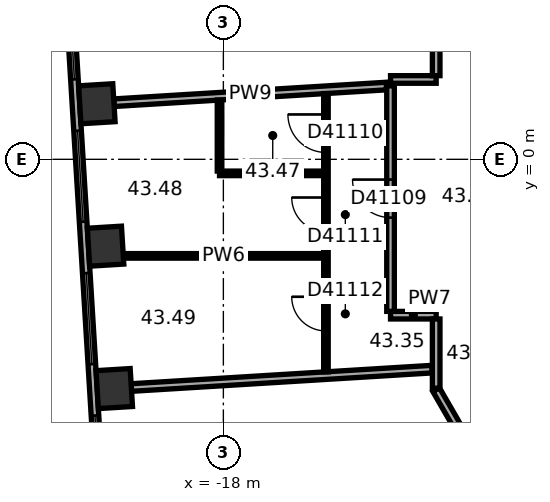
"""IFC4 building model, lengths in metres.
Left out: names, types, materials, properties, quantities, classifications, styles, units other than length and angle.
Written with IfcOpenShell. Run it as: python <this file> out.ifc"""

import sys

from ifc_helpers import new_model, si_unit, direction, frame, frame_2d, origin, origin_2d, place, context, subcontext, project, spatial, rectangle, extrude, element, fill, save


model = new_model("IFC4")
c1 = context("Model", 3, precision=1e-05, world=origin(), true_north=direction((0.0, 1.0)))
c2 = subcontext(c1, "Body", "Model", "MODEL_VIEW")
j1 = project(units=[si_unit("LENGTHUNIT", "METRE"), si_unit("PLANEANGLEUNIT", "RADIAN")], contexts=[c1])
p1 = place(None, origin())
s1 = spatial("IfcSite", under=j1, at=p1, CompositionType="ELEMENT")
p2 = place(p1, origin())
s2 = spatial("IfcBuilding", under=s1, at=p2, CompositionType="ELEMENT")
p3 = place(p2, frame((0.0, 0.0, 176.2)))
s3 = spatial("IfcBuildingStorey", under=s2, at=p3, CompositionType="ELEMENT", Elevation=176.2)
for number, where, z_axis, x_axis in (
    (1, (-21.329, 1.462, 0.0), (0.0, 0.0, 1.0), (0.061, -0.998, 0.0)),
    (2, (-21.1, -2.285, 0.0), (0.0, 0.0, 1.0), (0.061, -0.998, 0.0)),
    (3, (-20.871, -6.032, 0.0), (0.0, 0.0, 1.0), (0.061, -0.998, 0.0)),
):
    element("IfcColumn", number, at=place(p3, frame(where, z_axis=z_axis, x_axis=x_axis)), inside=s3, PredefinedType="COLUMN", context=c2, shape_type="SweptSolid", body=[
        extrude(rectangle(XDim=1.0, YDim=0.9, at=origin_2d()), origin(), (0.0, 0.0, 1.0), 3.7),
    ])
p4 = place(p3, frame((-22.375, 9.557, 0.0), z_axis=(0.0, 0.0, 1.0), x_axis=(0.061036015339, -0.998135564356, 0.0)))
e4 = element("IfcWall", 4, at=p4, inside=s3, PredefinedType="STANDARD", context=c2, shape_type="SweptSolid", body=[
    extrude(rectangle(XDim=20.044, YDim=0.2, at=frame_2d((10.022, 0.0))), origin(), (0.0, 0.0, 1.0), 3.7),
])
p5 = place(p4, frame((1.313, 0.0, 0.9)))
e5 = element("IfcOpeningElement", 5, at=p5, cuts=e4, PredefinedType="OPENING", context=c2, shape_type="SweptSolid", body=[
    extrude(rectangle(XDim=2.4, YDim=2.0, at=frame_2d((1.2, 1.0))), frame((0.0, 0.11, 0.0), z_axis=(0.0, -1.0, 0.0), x_axis=(1.0, 0.0, 0.0)), (0.0, 0.0, 1.0), 0.22),
])
p6 = place(p4, frame((5.067, 0.0, 0.9)))
e6 = element("IfcOpeningElement", 6, at=p6, cuts=e4, PredefinedType="OPENING", context=c2, shape_type="SweptSolid", body=[
    extrude(rectangle(XDim=2.4, YDim=2.0, at=frame_2d((1.2, 1.0))), frame((0.0, 0.11, 0.0), z_axis=(0.0, -1.0, 0.0), x_axis=(1.0, 0.0, 0.0)), (0.0, 0.0, 1.0), 0.22),
])
p7 = place(p4, frame((8.821, 0.0, 0.9)))
e7 = element("IfcOpeningElement", 7, at=p7, cuts=e4, PredefinedType="OPENING", context=c2, shape_type="SweptSolid", body=[
    extrude(rectangle(XDim=2.4, YDim=2.0, at=frame_2d((1.2, 1.0))), frame((0.0, 0.11, 0.0), z_axis=(0.0, -1.0, 0.0), x_axis=(1.0, 0.0, 0.0)), (0.0, 0.0, 1.0), 0.22),
])
p8 = place(p4, frame((12.575, 0.0, 0.9)))
e8 = element("IfcOpeningElement", 8, at=p8, cuts=e4, PredefinedType="OPENING", context=c2, shape_type="SweptSolid", body=[
    extrude(rectangle(XDim=2.4, YDim=2.0, at=frame_2d((1.2, 1.0))), frame((0.0, 0.11, 0.0), z_axis=(0.0, -1.0, 0.0), x_axis=(1.0, 0.0, 0.0)), (0.0, 0.0, 1.0), 0.22),
])
p9 = place(p4, frame((16.329, 0.0, 0.9)))
e9 = element("IfcOpeningElement", 9, at=p9, cuts=e4, PredefinedType="OPENING", context=c2, shape_type="SweptSolid", body=[
    extrude(rectangle(XDim=2.4, YDim=2.0, at=frame_2d((1.2, 1.0))), frame((0.0, 0.11, 0.0), z_axis=(0.0, -1.0, 0.0), x_axis=(1.0, 0.0, 0.0)), (0.0, 0.0, 1.0), 0.22),
])
p10 = place(p3, frame((-20.88, 1.49, 0.0), z_axis=(0.0, 0.0, 1.0), x_axis=(0.998134881975, 0.061047173439, 0.0)))
e10 = element("IfcWall", 10, at=p10, inside=s3, PredefinedType="PARTITIONING", context=c2, shape_type="SweptSolid", body=[
    extrude(rectangle(XDim=7.183, YDim=0.2, at=frame_2d((3.591, 0.0))), origin(), (0.0, 0.0, 1.0), 2.87),
])
p11 = place(p3, frame((-20.633, -2.541, 0.0), z_axis=(0.0, 0.0, 1.0), x_axis=(1.0, 0.0, 0.0)))
e11 = element("IfcWall", 11, at=p11, inside=s3, PredefinedType="PARTITIONING", context=c2, shape_type="SweptSolid", body=[
    extrude(rectangle(XDim=5.272, YDim=0.12, at=frame_2d((2.636, 0.0))), origin(), (0.0, 0.0, 1.0), 3.42),
])
p12 = place(p3, frame((-20.421, -6.005, 0.0), z_axis=(0.0, 0.0, 1.0), x_axis=(0.998134865741, 0.061047438866, 0.0)))
e12 = element("IfcWall", 12, at=p12, inside=s3, PredefinedType="PARTITIONING", context=c2, shape_type="SweptSolid", body=[
    extrude(rectangle(XDim=7.927, YDim=0.2, at=frame_2d((3.963, 0.0))), origin(), (0.0, 0.0, 1.0), 2.87),
])
p13 = place(p3, frame((-18.101, -0.369, 0.0), z_axis=(0.0, 0.0, 1.0), x_axis=(1.0, 0.0, 0.0)))
e13 = element("IfcWall", 13, at=p13, inside=s3, PredefinedType="PARTITIONING", context=c2, shape_type="SweptSolid", body=[
    extrude(rectangle(XDim=2.74, YDim=0.12, at=frame_2d((1.37, 0.0))), origin(), (0.0, 0.0, 1.0), 3.42),
])
p14 = place(p3, frame((-18.101, 1.559, 0.0), z_axis=(0.0, 0.0, 1.0), x_axis=(0.0, -1.0, 0.0)))
e14 = element("IfcWall", 14, at=p14, inside=s3, PredefinedType="PARTITIONING", context=c2, shape_type="SweptSolid", body=[
    extrude(rectangle(XDim=1.869, YDim=0.12, at=frame_2d((0.934, 0.0))), origin(), (0.0, 0.0, 1.0), 3.42),
])
p15 = place(p3, frame((-15.301, 1.731, 0.0), z_axis=(0.0, 0.0, 1.0), x_axis=(0.0, -1.0, 0.0)))
e15 = element("IfcWall", 15, at=p15, inside=s3, PredefinedType="PARTITIONING", context=c2, shape_type="SweptSolid", body=[
    extrude(rectangle(XDim=7.322, YDim=0.12, at=frame_2d((3.661, 0.0))), origin(), (0.0, 0.0, 1.0), 3.42),
])
p16 = place(p15, frame((0.55, 0.0, 0.0)))
e16 = element("IfcOpeningElement", 16, at=p16, cuts=e15, PredefinedType="OPENING", context=c2, shape_type="SweptSolid", body=[
    extrude(rectangle(XDim=1.0, YDim=2.1, at=frame_2d((0.5, 1.05))), frame((0.0, 0.07, 0.0), z_axis=(0.0, -1.0, 0.0), x_axis=(1.0, 0.0, 0.0)), (0.0, 0.0, 1.0), 0.14),
])
p17 = place(p15, frame((2.736, 0.0, 0.0)))
e17 = element("IfcOpeningElement", 17, at=p17, cuts=e15, PredefinedType="OPENING", context=c2, shape_type="SweptSolid", body=[
    extrude(rectangle(XDim=0.9, YDim=2.1, at=frame_2d((0.45, 1.05))), frame((0.0, 0.07, 0.0), z_axis=(0.0, -1.0, 0.0), x_axis=(1.0, 0.0, 0.0)), (0.0, 0.0, 1.0), 0.14),
])
p18 = place(p15, frame((5.347, 0.0, 0.0)))
e18 = element("IfcOpeningElement", 18, at=p18, cuts=e15, PredefinedType="OPENING", context=c2, shape_type="SweptSolid", body=[
    extrude(rectangle(XDim=0.9, YDim=2.1, at=frame_2d((0.45, 1.05))), frame((0.0, 0.07, 0.0), z_axis=(0.0, -1.0, 0.0), x_axis=(1.0, 0.0, 0.0)), (0.0, 0.0, 1.0), 0.14),
])
p19 = place(p3, frame((-13.601, -4.101, 0.0), z_axis=(0.0, 0.0, 1.0), x_axis=(1.0, 0.0, 0.0)))
e19 = element("IfcWall", 19, at=p19, inside=s3, PredefinedType="PARTITIONING", context=c2, shape_type="SweptSolid", body=[
    extrude(rectangle(XDim=1.201, YDim=0.2, at=frame_2d((0.601, 0.0))), origin(), (0.0, 0.0, 1.0), 3.42),
])
p20 = place(p3, frame((-13.601, 1.935, 0.0), z_axis=(0.0, 0.0, 1.0), x_axis=(0.0, -1.0, 0.0)))
e20 = element("IfcWall", 20, at=p20, inside=s3, PredefinedType="PARTITIONING", context=c2, shape_type="SweptSolid", body=[
    extrude(rectangle(XDim=5.936, YDim=0.2, at=frame_2d((2.968, 0.0))), origin(), (0.0, 0.0, 1.0), 3.42),
])
p21 = place(p20, frame((2.468, 0.0, 0.0)))
e21 = element("IfcOpeningElement", 21, at=p21, cuts=e20, PredefinedType="OPENING", context=c2, shape_type="SweptSolid", body=[
    extrude(rectangle(XDim=1.0, YDim=2.1, at=frame_2d((0.5, 1.05))), frame((0.0, 0.11, 0.0), z_axis=(0.0, -1.0, 0.0), x_axis=(1.0, 0.0, 0.0)), (0.0, 0.0, 1.0), 0.22),
])
p22 = place(p3, frame((-12.4, -6.062, 0.0), z_axis=(0.0, 0.0, 1.0), x_axis=(0.500022797313, -0.86601224135, 0.0)))
e22 = element("IfcWall", 22, at=p22, inside=s3, PredefinedType="PARTITIONING", context=c2, shape_type="SweptSolid", body=[
    extrude(rectangle(XDim=1.9, YDim=0.2, at=frame_2d((0.95, 0.0))), origin(), (0.0, 0.0, 1.0), 3.42),
])
p23 = place(p3, frame((-12.4, -4.201, 0.0), z_axis=(0.0, 0.0, 1.0), x_axis=(0.0, -1.0, 0.0)))
e23 = element("IfcWall", 23, at=p23, inside=s3, PredefinedType="PARTITIONING", context=c2, shape_type="SweptSolid", body=[
    extrude(rectangle(XDim=1.821, YDim=0.2, at=frame_2d((0.911, 0.0))), origin(), (0.0, 0.0, 1.0), 3.42),
])
p24 = place(p3, frame((-12.4, 2.101, 0.0), z_axis=(0.0, 0.0, 1.0), x_axis=(-1.0, 0.0, 0.0)))
e24 = element("IfcWall", 24, at=p24, inside=s3, PredefinedType="PARTITIONING", context=c2, shape_type="SweptSolid", body=[
    extrude(rectangle(XDim=1.201, YDim=0.2, at=frame_2d((0.601, 0.0))), origin(), (0.0, 0.0, 1.0), 3.42),
])
p25 = place(p3, frame((-12.4, 5.812, 0.0), z_axis=(0.0, 0.0, 1.0), x_axis=(0.0, -1.0, 0.0)))
e25 = element("IfcWall", 25, at=p25, inside=s3, PredefinedType="PARTITIONING", context=c2, shape_type="SweptSolid", body=[
    extrude(rectangle(XDim=3.611, YDim=0.2, at=frame_2d((1.806, 0.0))), origin(), (0.0, 0.0, 1.0), 3.42),
])
p26 = place(p6, origin())
e26 = element("IfcWindow", 26, at=p26, inside=s3, PartitioningType="SINGLE_PANEL", PredefinedType="WINDOW", context=c2, shape_type="SweptSolid", body=[
    extrude(rectangle(XDim=2.4, YDim=2.0, at=frame_2d((1.2, 1.0))), frame((0.0, 0.03, 0.0), z_axis=(0.0, -1.0, 0.0), x_axis=(1.0, 0.0, 0.0)), (0.0, 0.0, 1.0), 0.06),
])
fill(e6, e26)
p27 = place(p7, origin())
e27 = element("IfcWindow", 27, at=p27, inside=s3, PartitioningType="SINGLE_PANEL", PredefinedType="WINDOW", context=c2, shape_type="SweptSolid", body=[
    extrude(rectangle(XDim=2.4, YDim=2.0, at=frame_2d((1.2, 1.0))), frame((0.0, 0.03, 0.0), z_axis=(0.0, -1.0, 0.0), x_axis=(1.0, 0.0, 0.0)), (0.0, 0.0, 1.0), 0.06),
])
fill(e7, e27)
p28 = place(p8, origin())
e28 = element("IfcWindow", 28, at=p28, inside=s3, PartitioningType="SINGLE_PANEL", PredefinedType="WINDOW", context=c2, shape_type="SweptSolid", body=[
    extrude(rectangle(XDim=2.4, YDim=2.0, at=frame_2d((1.2, 1.0))), frame((0.0, 0.03, 0.0), z_axis=(0.0, -1.0, 0.0), x_axis=(1.0, 0.0, 0.0)), (0.0, 0.0, 1.0), 0.06),
])
fill(e8, e28)
p29 = place(p9, origin())
e29 = element("IfcWindow", 29, at=p29, inside=s3, PartitioningType="SINGLE_PANEL", PredefinedType="WINDOW", context=c2, shape_type="SweptSolid", body=[
    extrude(rectangle(XDim=2.4, YDim=2.0, at=frame_2d((1.2, 1.0))), frame((0.0, 0.03, 0.0), z_axis=(0.0, -1.0, 0.0), x_axis=(1.0, 0.0, 0.0)), (0.0, 0.0, 1.0), 0.06),
])
fill(e9, e29)
p30 = place(p21, origin())
e30 = element("IfcDoor", 30, at=p30, inside=s3, OperationType="SINGLE_SWING_LEFT", PredefinedType="DOOR", context=c2, shape_type="SweptSolid", body=[
    extrude(rectangle(XDim=1.0, YDim=2.1, at=frame_2d((0.5, 1.05))), frame((0.0, 0.025, 0.0), z_axis=(0.0, -1.0, 0.0), x_axis=(1.0, 0.0, 0.0)), (0.0, 0.0, 1.0), 0.05),
])
fill(e21, e30)
p31 = place(p16, origin())
e31 = element("IfcDoor", 31, at=p31, inside=s3, OperationType="SINGLE_SWING_LEFT", PredefinedType="DOOR", context=c2, shape_type="SweptSolid", body=[
    extrude(rectangle(XDim=1.0, YDim=2.1, at=frame_2d((0.5, 1.05))), frame((0.0, 0.025, 0.0), z_axis=(0.0, -1.0, 0.0), x_axis=(1.0, 0.0, 0.0)), (0.0, 0.0, 1.0), 0.05),
])
fill(e16, e31)
p32 = place(p17, origin())
e32 = element("IfcDoor", 32, at=p32, inside=s3, OperationType="SINGLE_SWING_LEFT", PredefinedType="DOOR", context=c2, shape_type="SweptSolid", body=[
    extrude(rectangle(XDim=0.9, YDim=2.1, at=frame_2d((0.45, 1.05))), frame((0.0, 0.025, 0.0), z_axis=(0.0, -1.0, 0.0), x_axis=(1.0, 0.0, 0.0)), (0.0, 0.0, 1.0), 0.05),
])
fill(e17, e32)
p33 = place(p18, origin())
e33 = element("IfcDoor", 33, at=p33, inside=s3, OperationType="SINGLE_SWING_LEFT", PredefinedType="DOOR", context=c2, shape_type="SweptSolid", body=[
    extrude(rectangle(XDim=0.9, YDim=2.1, at=frame_2d((0.45, 1.05))), frame((0.0, 0.025, 0.0), z_axis=(0.0, -1.0, 0.0), x_axis=(1.0, 0.0, 0.0)), (0.0, 0.0, 1.0), 0.05),
])
fill(e18, e33)
save(model, sys.argv[1])
